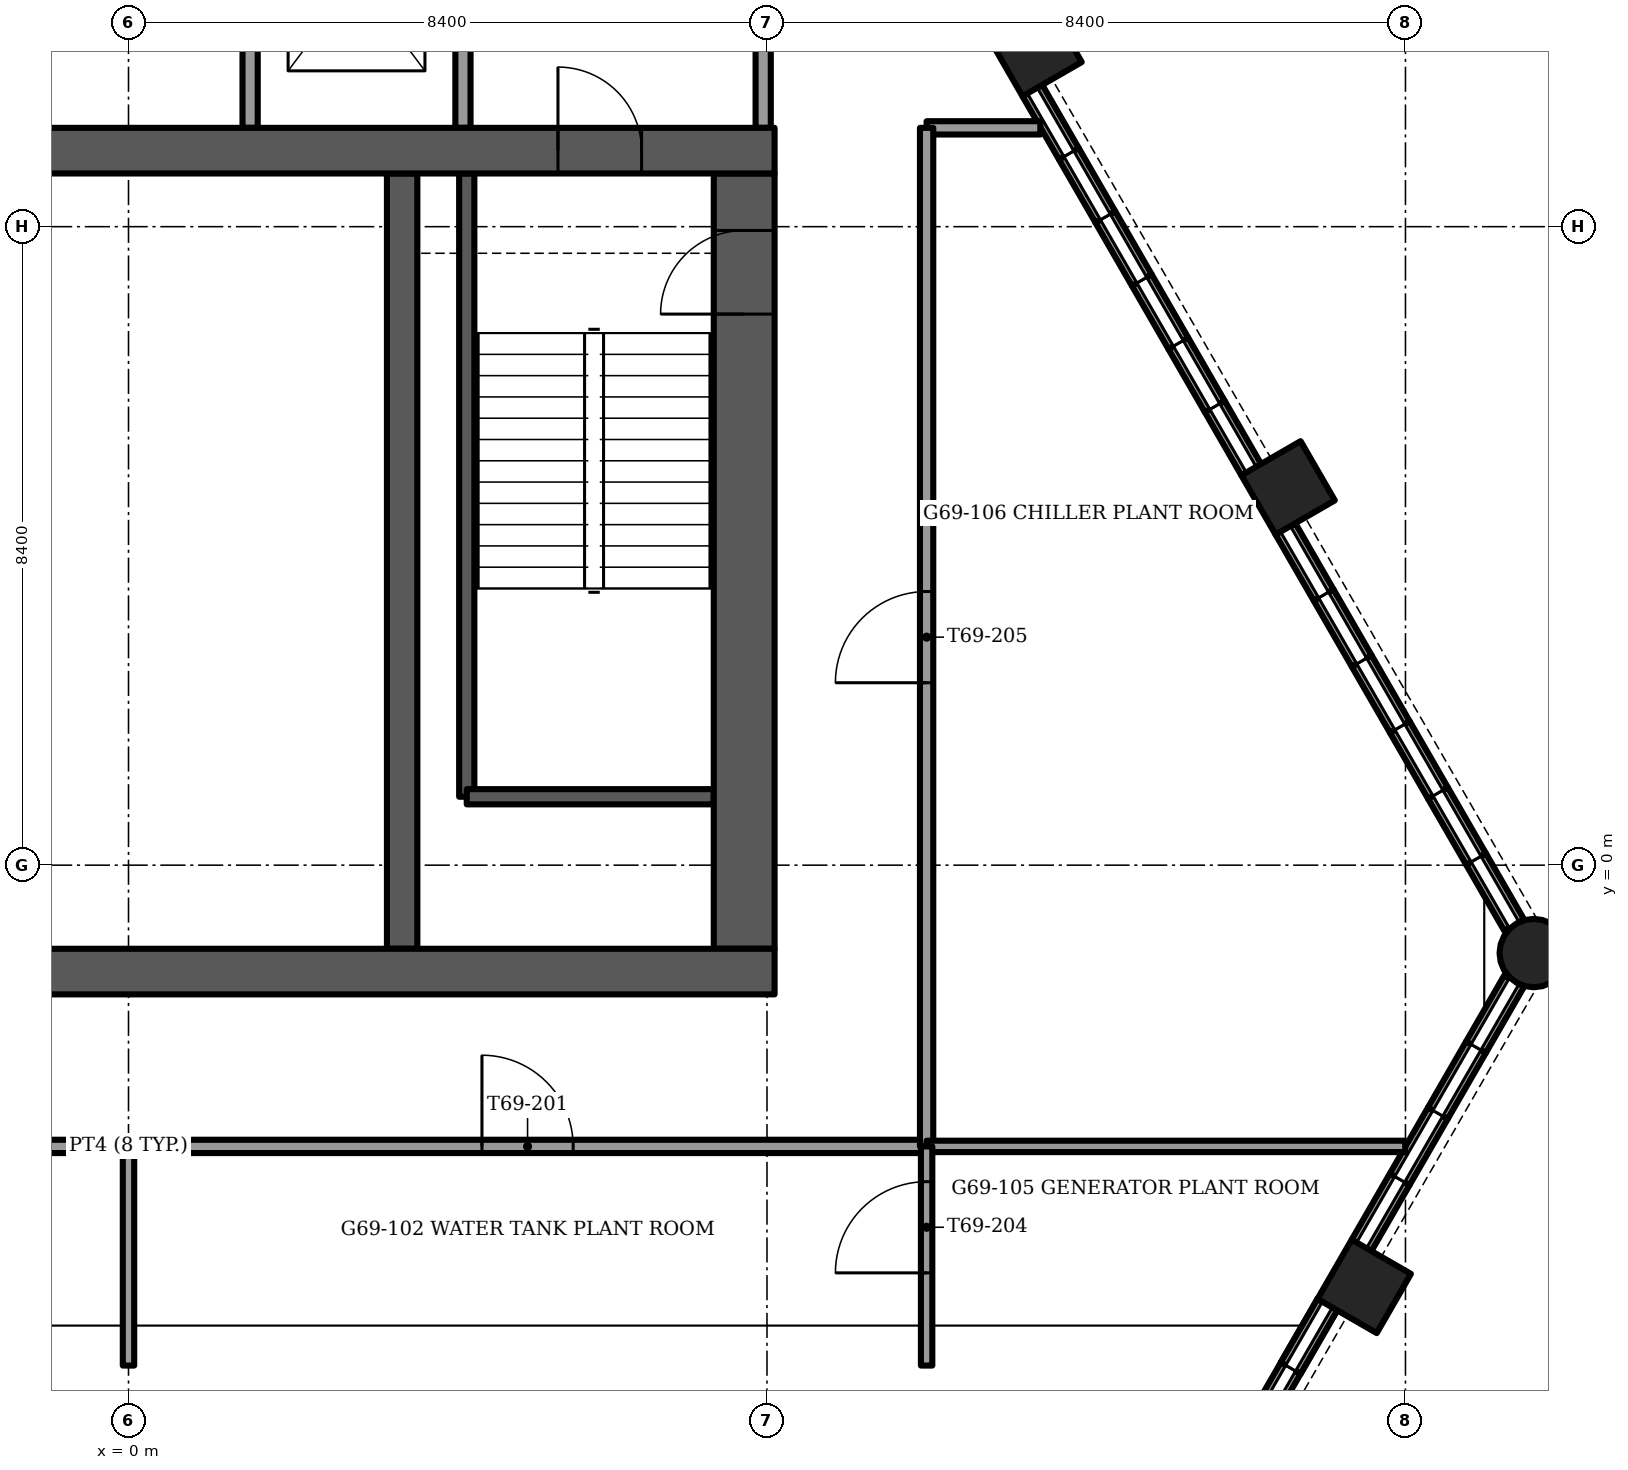
"""IFC4 building model, lengths in metres.
Left out: names, types, materials, properties, quantities, classifications, styles, units other than length and angle.
Written with IfcOpenShell. Run it as: python <this file> out.ifc"""

import sys

from ifc_helpers import new_model, si_unit, direction, frame, frame_2d, origin, origin_2d, place, context, subcontext, project, spatial, rectangle, circle, extrude, element, fill, save


model = new_model("IFC4")
c1 = context("Model", 3, precision=1e-05, world=origin(), true_north=direction((0.0, 1.0)))
c2 = subcontext(c1, "Body", "Model", "MODEL_VIEW")
j1 = project(units=[si_unit("LENGTHUNIT", "METRE"), si_unit("PLANEANGLEUNIT", "RADIAN")], contexts=[c1])
p1 = place(None, origin())
s1 = spatial("IfcSite", under=j1, at=p1, CompositionType="ELEMENT")
p2 = place(p1, origin())
s2 = spatial("IfcBuilding", under=s1, at=p2, CompositionType="ELEMENT")
p3 = place(p2, frame((0.0, 0.0, 279.5)))
s3 = spatial("IfcBuildingStorey", under=s2, at=p3, CompositionType="ELEMENT", Elevation=279.5)
p4 = place(p3, frame((-8.5, -1.4, -0.3), z_axis=(0.0, 0.0, 1.0), x_axis=(1.0, 0.0, 0.0)))
e1 = element("IfcWall", 1, at=p4, inside=s3, PredefinedType="SHEAR", context=c2, shape_type="SweptSolid", body=[
    extrude(rectangle(XDim=17.0, YDim=0.6, at=frame_2d((8.5, 0.0))), origin(), (0.0, 0.0, 1.0), 4.5),
])
p5 = place(p3, frame((-8.5, 9.4, -0.3), z_axis=(0.0, 0.0, 1.0), x_axis=(1.0, 0.0, 0.0)))
e2 = element("IfcWall", 2, at=p5, inside=s3, PredefinedType="SHEAR", context=c2, shape_type="SweptSolid", body=[
    extrude(rectangle(XDim=17.0, YDim=0.6, at=frame_2d((8.5, 0.0))), origin(), (0.0, 0.0, 1.0), 4.5),
])
p6 = place(p5, frame((1.75, 0.0, 0.0)))
e3 = element("IfcOpeningElement", 3, at=p6, cuts=e2, PredefinedType="OPENING", context=c2, shape_type="SweptSolid", body=[
    extrude(rectangle(XDim=1.1, YDim=2.1, at=frame_2d((0.55, 1.05))), frame((0.0, 0.3, 0.0), z_axis=(0.0, -1.0, 0.0), x_axis=(1.0, 0.0, 0.0)), (0.0, 0.0, 1.0), 0.6),
])
p7 = place(p5, frame((14.15, 0.0, 0.0)))
e4 = element("IfcOpeningElement", 4, at=p7, cuts=e2, PredefinedType="OPENING", context=c2, shape_type="SweptSolid", body=[
    extrude(rectangle(XDim=1.1, YDim=2.1, at=frame_2d((0.55, 1.05))), frame((0.0, 0.3, 0.0), z_axis=(0.0, -1.0, 0.0), x_axis=(1.0, 0.0, 0.0)), (0.0, 0.0, 1.0), 0.6),
])
p8 = place(p3, frame((8.1, -1.1, -0.3), z_axis=(0.0, 0.0, 1.0), x_axis=(0.0, 1.0, 0.0)))
e5 = element("IfcWall", 5, at=p8, inside=s3, PredefinedType="SHEAR", context=c2, shape_type="SweptSolid", body=[
    extrude(rectangle(XDim=10.2, YDim=0.8, at=frame_2d((5.1, 0.0))), origin(), (0.0, 0.0, 1.0), 4.5),
])
p9 = place(p8, frame((8.35, 0.0, 0.0)))
e6 = element("IfcOpeningElement", 6, at=p9, cuts=e5, PredefinedType="OPENING", context=c2, shape_type="SweptSolid", body=[
    extrude(rectangle(XDim=1.1, YDim=2.1, at=frame_2d((0.55, 1.05))), frame((0.0, 0.4, 0.0), z_axis=(0.0, -1.0, 0.0), x_axis=(1.0, 0.0, 0.0)), (0.0, 0.0, 1.0), 0.8),
])
p10 = place(p3, frame((3.6, -1.1, -0.3), z_axis=(0.0, 0.0, 1.0), x_axis=(0.0, 1.0, 0.0)))
e7 = element("IfcWall", 7, at=p10, inside=s3, PredefinedType="SHEAR", context=c2, shape_type="SweptSolid", body=[
    extrude(rectangle(XDim=10.2, YDim=0.4, at=frame_2d((5.1, 0.0))), origin(), (0.0, 0.0, 1.0), 4.5),
])
p11 = place(p3, frame((18.487, -1.156, -1.2), z_axis=(0.0, 0.0, 1.0), x_axis=(1.0, 0.0, 0.0)))
e8 = element("IfcColumn", 8, at=p11, inside=s3, PredefinedType="COLUMN", context=c2, shape_type="SweptSolid", body=[
    extrude(circle(Radius=0.45, at=origin_2d()), origin(), (0.0, 0.0, 1.0), 4.5),
])
for number, where, z_axis, x_axis in (
    (9, (16.257, -5.542, -1.2), (0.0, 0.0, 1.0), (-0.5, -0.866, 0.0)),
    (10, (15.256, 4.963, -1.2), (0.0, 0.0, 1.0), (0.5, -0.866, 0.0)),
    (11, (11.926, 10.73, -1.2), (0.0, 0.0, 1.0), (0.5, -0.866, 0.0)),
):
    element("IfcColumn", number, at=place(p3, frame(where, z_axis=z_axis, x_axis=x_axis)), inside=s3, PredefinedType="COLUMN", context=c2, shape_type="SweptSolid", body=[
        extrude(rectangle(XDim=0.9, YDim=0.9, at=origin_2d()), origin(), (0.0, 0.0, 1.0), 4.5),
    ])
for number, where, z_axis, x_axis in (
    (12, (14.808, -7.452, 0.0), (0.0, 0.0, 1.0), (0.5, 0.866, 0.0)),
    (13, (15.29, -6.617, 0.0), (0.0, 0.0, 1.0), (0.5, 0.866, 0.0)),
):
    element("IfcWall", number, at=place(p3, frame(where, z_axis=z_axis, x_axis=x_axis)), inside=s3, PredefinedType="SOLIDWALL", context=c2, shape_type="SweptSolid", body=[
        extrude(rectangle(XDim=0.965, YDim=0.3, at=frame_2d((0.482, 0.0))), origin(), (0.0, 0.0, 1.0), 1.0),
    ])
p12 = place(p3, frame((15.29, -6.617, 3.3), z_axis=(0.0, 0.0, 1.0), x_axis=(0.500058339205, 0.865991719008, 0.0)))
e14 = element("IfcWall", 14, at=p12, inside=s3, PredefinedType="SOLIDWALL", context=c2, shape_type="SweptSolid", body=[
    extrude(rectangle(XDim=0.965, YDim=0.3, at=frame_2d((0.482, 0.0))), origin(), (0.0, 0.0, 1.0), 0.273),
])
p13 = place(p3, frame((16.222, -5.002, 0.0), z_axis=(0.0, 0.0, 1.0), x_axis=(0.500115484592, 0.865958718457, 0.0)))
e15 = element("IfcWall", 15, at=p13, inside=s3, PredefinedType="SOLIDWALL", context=c2, shape_type="SweptSolid", body=[
    extrude(rectangle(XDim=1.004, YDim=0.3, at=frame_2d((0.502, 0.0))), origin(), (0.0, 0.0, 1.0), 1.0),
])
p14 = place(p3, frame((16.724, -4.133, 0.0), z_axis=(0.0, 0.0, 1.0), x_axis=(0.499904868165, 0.866080321209, 0.0)))
e16 = element("IfcWall", 16, at=p14, inside=s3, PredefinedType="SOLIDWALL", context=c2, shape_type="SweptSolid", body=[
    extrude(rectangle(XDim=1.004, YDim=0.3, at=frame_2d((0.502, 0.0))), origin(), (0.0, 0.0, 1.0), 1.0),
])
p15 = place(p3, frame((17.226, -3.263, 0.0), z_axis=(0.0, 0.0, 1.0), x_axis=(0.499933044277, 0.866064057238, 0.0)))
e17 = element("IfcWall", 17, at=p15, inside=s3, PredefinedType="SOLIDWALL", context=c2, shape_type="SweptSolid", body=[
    extrude(rectangle(XDim=1.004, YDim=0.3, at=frame_2d((0.502, 0.0))), origin(), (0.0, 0.0, 1.0), 1.0),
])
p16 = place(p3, frame((17.728, -2.394, 0.0), z_axis=(0.0, 0.0, 1.0), x_axis=(0.500010157896, 0.866019539041, 0.0)))
e18 = element("IfcWall", 18, at=p16, inside=s3, PredefinedType="SOLIDWALL", context=c2, shape_type="SweptSolid", body=[
    extrude(rectangle(XDim=1.004, YDim=0.3, at=frame_2d((0.502, 0.0))), origin(), (0.0, 0.0, 1.0), 1.0),
])
for number, where, z_axis, x_axis in (
    (19, (18.23, -0.788, 0.0), (0.0, 0.0, 1.0), (-0.5, 0.866, 0.0)),
    (20, (17.729, 0.08, 0.0), (0.0, 0.0, 1.0), (-0.5, 0.866, 0.0)),
    (21, (17.227, 0.949, 0.0), (0.0, 0.0, 1.0), (-0.5, 0.866, 0.0)),
    (22, (16.726, 1.818, 0.0), (0.0, 0.0, 1.0), (-0.5, 0.866, 0.0)),
):
    element("IfcWall", number, at=place(p3, frame(where, z_axis=z_axis, x_axis=x_axis)), inside=s3, PredefinedType="SOLIDWALL", context=c2, shape_type="SweptSolid", body=[
        extrude(rectangle(XDim=1.003, YDim=0.3, at=frame_2d((0.501, 0.0))), origin(), (0.0, 0.0, 1.0), 1.0),
    ])
p17 = place(p3, frame((16.224, 2.686, 0.0), z_axis=(0.0, 0.0, 1.0), x_axis=(-0.500143783026, 0.865942374699, 0.0)))
e23 = element("IfcWall", 23, at=p17, inside=s3, PredefinedType="SOLIDWALL", context=c2, shape_type="SweptSolid", body=[
    extrude(rectangle(XDim=1.003, YDim=0.3, at=frame_2d((0.501, 0.0))), origin(), (0.0, 0.0, 1.0), 1.0),
])
p18 = place(p3, frame((15.722, 3.555, 0.0), z_axis=(0.0, 0.0, 1.0), x_axis=(-0.499961250474, 0.866047774678, 0.0)))
e24 = element("IfcWall", 24, at=p18, inside=s3, PredefinedType="SOLIDWALL", context=c2, shape_type="SweptSolid", body=[
    extrude(rectangle(XDim=1.003, YDim=0.3, at=frame_2d((0.501, 0.0))), origin(), (0.0, 0.0, 1.0), 1.0),
])
p19 = place(p3, frame((14.771, 5.203, 0.0), z_axis=(0.0, 0.0, 1.0), x_axis=(-0.500133489192, 0.865948320045, 0.0)))
e25 = element("IfcWall", 25, at=p19, inside=s3, PredefinedType="SOLIDWALL", context=c2, shape_type="SweptSolid", body=[
    extrude(rectangle(XDim=0.96, YDim=0.3, at=frame_2d((0.48, 0.0))), origin(), (0.0, 0.0, 1.0), 1.0),
])
p20 = place(p3, frame((14.291, 6.034, 0.0), z_axis=(0.0, 0.0, 1.0), x_axis=(-0.500023335103, 0.866011930837, 0.0)))
e26 = element("IfcWall", 26, at=p20, inside=s3, PredefinedType="SOLIDWALL", context=c2, shape_type="SweptSolid", body=[
    extrude(rectangle(XDim=0.96, YDim=0.3, at=frame_2d((0.48, 0.0))), origin(), (0.0, 0.0, 1.0), 1.0),
])
p21 = place(p3, frame((13.811, 6.865, 0.0), z_axis=(0.0, 0.0, 1.0), x_axis=(-0.499832553123, 0.866122057702, 0.0)))
e27 = element("IfcWall", 27, at=p21, inside=s3, PredefinedType="SOLIDWALL", context=c2, shape_type="SweptSolid", body=[
    extrude(rectangle(XDim=0.96, YDim=0.3, at=frame_2d((0.48, 0.0))), origin(), (0.0, 0.0, 1.0), 1.0),
])
p22 = place(p3, frame((13.331, 7.697, 0.0), z_axis=(0.0, 0.0, 1.0), x_axis=(-0.500023335103, 0.866011930837, 0.0)))
e28 = element("IfcWall", 28, at=p22, inside=s3, PredefinedType="SOLIDWALL", context=c2, shape_type="SweptSolid", body=[
    extrude(rectangle(XDim=0.96, YDim=0.3, at=frame_2d((0.48, 0.0))), origin(), (0.0, 0.0, 1.0), 1.0),
])
for number, where, z_axis, x_axis in (
    (29, (12.851, 8.528, 0.0), (0.0, 0.0, 1.0), (-0.5, 0.866, 0.0)),
    (30, (12.371, 9.359, 0.0), (0.0, 0.0, 1.0), (-0.5, 0.866, 0.0)),
):
    element("IfcWall", number, at=place(p3, frame(where, z_axis=z_axis, x_axis=x_axis)), inside=s3, PredefinedType="SOLIDWALL", context=c2, shape_type="SweptSolid", body=[
        extrude(rectangle(XDim=0.96, YDim=0.3, at=frame_2d((0.48, 0.0))), origin(), (0.0, 0.0, 1.0), 1.0),
    ])
p23 = place(p3, frame((-10.5, -3.7, 0.0), z_axis=(0.0, 0.0, 1.0), x_axis=(1.0, 0.0, 0.0)))
e31 = element("IfcWall", 31, at=p23, inside=s3, PredefinedType="PARTITIONING", context=c2, shape_type="SweptSolid", body=[
    extrude(rectangle(XDim=21.0, YDim=0.175, at=frame_2d((10.5, 0.0))), origin(), (0.0, 0.0, 1.0), 4.2),
])
p24 = place(p23, frame((4.65, 0.0, 0.0)))
e32 = element("IfcOpeningElement", 32, at=p24, cuts=e31, PredefinedType="OPENING", context=c2, shape_type="SweptSolid", body=[
    extrude(rectangle(XDim=1.2, YDim=2.1, at=frame_2d((0.6, 1.05))), frame((0.0, 0.087, 0.0), z_axis=(0.0, -1.0, 0.0), x_axis=(1.0, 0.0, 0.0)), (0.0, 0.0, 1.0), 0.175),
])
p25 = place(p23, frame((15.15, 0.0, 0.0)))
e33 = element("IfcOpeningElement", 33, at=p25, cuts=e31, PredefinedType="OPENING", context=c2, shape_type="SweptSolid", body=[
    extrude(rectangle(XDim=1.2, YDim=2.1, at=frame_2d((0.6, 1.05))), frame((0.0, 0.087, 0.0), z_axis=(0.0, -1.0, 0.0), x_axis=(1.0, 0.0, 0.0)), (0.0, 0.0, 1.0), 0.175),
])
p26 = place(p3, frame((10.5, 9.7, 0.0), z_axis=(0.0, 0.0, 1.0), x_axis=(1.0, 0.0, 0.0)))
e34 = element("IfcWall", 34, at=p26, inside=s3, PredefinedType="PARTITIONING", context=c2, shape_type="SweptSolid", body=[
    extrude(rectangle(XDim=1.496, YDim=0.175, at=frame_2d((0.748, 0.0))), origin(), (0.0, 0.0, 1.0), 4.2),
])
p27 = place(p3, frame((10.5, -3.7, 0.0), z_axis=(0.0, 0.0, 1.0), x_axis=(0.0, 1.0, 0.0)))
e35 = element("IfcWall", 35, at=p27, inside=s3, PredefinedType="PARTITIONING", context=c2, shape_type="SweptSolid", body=[
    extrude(rectangle(XDim=13.4, YDim=0.175, at=frame_2d((6.7, 0.0))), origin(), (0.0, 0.0, 1.0), 4.2),
])
p28 = place(p27, frame((6.1, 0.0, 0.0)))
e36 = element("IfcOpeningElement", 36, at=p28, cuts=e35, PredefinedType="OPENING", context=c2, shape_type="SweptSolid", body=[
    extrude(rectangle(XDim=1.2, YDim=2.1, at=frame_2d((0.6, 1.05))), frame((0.0, 0.087, 0.0), z_axis=(0.0, -1.0, 0.0), x_axis=(1.0, 0.0, 0.0)), (0.0, 0.0, 1.0), 0.175),
])
p29 = place(p3, frame((10.5, -3.7, 0.0), z_axis=(0.0, 0.0, 1.0), x_axis=(1.0, 0.0, 0.0)))
e37 = element("IfcWall", 37, at=p29, inside=s3, PredefinedType="PARTITIONING", context=c2, shape_type="SweptSolid", body=[
    extrude(rectangle(XDim=6.296, YDim=0.15, at=frame_2d((3.148, 0.0))), origin(), (0.0, 0.0, 1.0), 4.2),
])
p30 = place(p3, frame((0.0, -6.583, 0.0), z_axis=(0.0, 0.0, 1.0), x_axis=(0.0, 1.0, 0.0)))
e38 = element("IfcWall", 38, at=p30, inside=s3, PredefinedType="PARTITIONING", context=c2, shape_type="SweptSolid", body=[
    extrude(rectangle(XDim=2.883, YDim=0.15, at=frame_2d((1.442, 0.0))), origin(), (0.0, 0.0, 1.0), 4.155),
])
p31 = place(p3, frame((10.5, -6.583, 0.0), z_axis=(0.0, 0.0, 1.0), x_axis=(0.0, 1.0, 0.0)))
e39 = element("IfcWall", 39, at=p31, inside=s3, PredefinedType="PARTITIONING", context=c2, shape_type="SweptSolid", body=[
    extrude(rectangle(XDim=2.883, YDim=0.15, at=frame_2d((1.442, 0.0))), origin(), (0.0, 0.0, 1.0), 4.155),
])
p32 = place(p31, frame((1.219, 0.0, 0.0)))
e40 = element("IfcOpeningElement", 40, at=p32, cuts=e39, PredefinedType="OPENING", context=c2, shape_type="SweptSolid", body=[
    extrude(rectangle(XDim=1.2, YDim=2.1, at=frame_2d((0.6, 1.05))), frame((0.0, 0.075, 0.0), z_axis=(0.0, -1.0, 0.0), x_axis=(1.0, 0.0, 0.0)), (0.0, 0.0, 1.0), 0.15),
])
p33 = place(p3, frame((4.45, 0.9, -0.3), z_axis=(0.0, 0.0, 1.0), x_axis=(0.0, 1.0, 0.0)))
e41 = element("IfcWall", 41, at=p33, inside=s3, PredefinedType="SOLIDWALL", context=c2, shape_type="SweptSolid", body=[
    extrude(rectangle(XDim=8.2, YDim=0.2, at=frame_2d((4.1, 0.0))), origin(), (0.0, 0.0, 1.0), 4.5),
])
p34 = place(p3, frame((4.45, 0.9, -0.3), z_axis=(0.0, 0.0, 1.0), x_axis=(1.0, 0.0, 0.0)))
e42 = element("IfcWall", 42, at=p34, inside=s3, PredefinedType="SOLIDWALL", context=c2, shape_type="SweptSolid", body=[
    extrude(rectangle(XDim=3.25, YDim=0.2, at=frame_2d((1.625, 0.0))), origin(), (0.0, 0.0, 1.0), 4.5),
])
p35 = place(p3, frame((8.35, 9.7, 0.0), z_axis=(0.0, 0.0, 1.0), x_axis=(0.0, 1.0, 0.0)))
e43 = element("IfcWall", 43, at=p35, inside=s3, PredefinedType="PARTITIONING", context=c2, shape_type="SweptSolid", body=[
    extrude(rectangle(XDim=3.9, YDim=0.2, at=frame_2d((1.95, 0.0))), origin(), (0.0, 0.0, 1.0), 4.2),
])
p36 = place(p35, frame((1.35, 0.0, 0.0)))
e44 = element("IfcOpeningElement", 44, at=p36, cuts=e43, PredefinedType="OPENING", context=c2, shape_type="SweptSolid", body=[
    extrude(rectangle(XDim=1.2, YDim=2.1, at=frame_2d((0.6, 1.05))), frame((0.0, 0.1, 0.0), z_axis=(0.0, -1.0, 0.0), x_axis=(1.0, 0.0, 0.0)), (0.0, 0.0, 1.0), 0.2),
])
p37 = place(p3, frame((4.4, 9.7, 0.0), z_axis=(0.0, 0.0, 1.0), x_axis=(0.0, 1.0, 0.0)))
e45 = element("IfcWall", 45, at=p37, inside=s3, PredefinedType="PARTITIONING", context=c2, shape_type="SweptSolid", body=[
    extrude(rectangle(XDim=3.9, YDim=0.2, at=frame_2d((1.95, 0.0))), origin(), (0.0, 0.0, 1.0), 4.2),
])
p38 = place(p37, frame((1.35, 0.0, 0.0)))
e46 = element("IfcOpeningElement", 46, at=p38, cuts=e45, PredefinedType="OPENING", context=c2, shape_type="SweptSolid", body=[
    extrude(rectangle(XDim=1.2, YDim=2.1, at=frame_2d((0.6, 1.05))), frame((0.0, 0.1, 0.0), z_axis=(0.0, -1.0, 0.0), x_axis=(1.0, 0.0, 0.0)), (0.0, 0.0, 1.0), 0.2),
])
p39 = place(p3, frame((1.6, 9.7, 0.0), z_axis=(0.0, 0.0, 1.0), x_axis=(0.0, 1.0, 0.0)))
e47 = element("IfcWall", 47, at=p39, inside=s3, PredefinedType="PARTITIONING", context=c2, shape_type="SweptSolid", body=[
    extrude(rectangle(XDim=3.9, YDim=0.2, at=frame_2d((1.95, 0.0))), origin(), (0.0, 0.0, 1.0), 4.2),
])
p40 = place(p25, origin())
e48 = element("IfcDoor", 48, at=p40, inside=s3, OperationType="SINGLE_SWING_LEFT", PredefinedType="DOOR", context=c2, shape_type="SweptSolid", body=[
    extrude(rectangle(XDim=1.2, YDim=2.1, at=frame_2d((0.6, 1.05))), frame((0.0, 0.025, 0.0), z_axis=(0.0, -1.0, 0.0), x_axis=(1.0, 0.0, 0.0)), (0.0, 0.0, 1.0), 0.05),
])
fill(e33, e48)
p41 = place(p32, origin())
e49 = element("IfcDoor", 49, at=p41, inside=s3, OperationType="SINGLE_SWING_RIGHT", PredefinedType="DOOR", context=c2, shape_type="SweptSolid", body=[
    extrude(rectangle(XDim=1.2, YDim=2.1, at=frame_2d((0.6, 1.05))), frame((0.0, 0.025, 0.0), z_axis=(0.0, -1.0, 0.0), x_axis=(1.0, 0.0, 0.0)), (0.0, 0.0, 1.0), 0.05),
])
fill(e40, e49)
p42 = place(p28, origin())
e50 = element("IfcDoor", 50, at=p42, inside=s3, OperationType="SINGLE_SWING_LEFT", PredefinedType="DOOR", context=c2, shape_type="SweptSolid", body=[
    extrude(rectangle(XDim=1.2, YDim=2.1, at=frame_2d((0.6, 1.05))), frame((0.0, 0.025, 0.0), z_axis=(0.0, -1.0, 0.0), x_axis=(1.0, 0.0, 0.0)), (0.0, 0.0, 1.0), 0.05),
])
fill(e36, e50)
p43 = place(p7, origin())
e51 = element("IfcDoor", 51, at=p43, inside=s3, OperationType="SINGLE_SWING_RIGHT", PredefinedType="DOOR", context=c2, shape_type="SweptSolid", body=[
    extrude(rectangle(XDim=1.1, YDim=2.1, at=frame_2d((0.55, 1.05))), frame((0.0, 0.025, 0.0), z_axis=(0.0, -1.0, 0.0), x_axis=(1.0, 0.0, 0.0)), (0.0, 0.0, 1.0), 0.05),
])
fill(e4, e51)
p44 = place(p9, origin())
e52 = element("IfcDoor", 52, at=p44, inside=s3, OperationType="SINGLE_SWING_LEFT", PredefinedType="DOOR", context=c2, shape_type="SweptSolid", body=[
    extrude(rectangle(XDim=1.1, YDim=2.1, at=frame_2d((0.55, 1.05))), frame((0.0, 0.025, 0.0), z_axis=(0.0, -1.0, 0.0), x_axis=(1.0, 0.0, 0.0)), (0.0, 0.0, 1.0), 0.05),
])
fill(e6, e52)
save(model, sys.argv[1])
